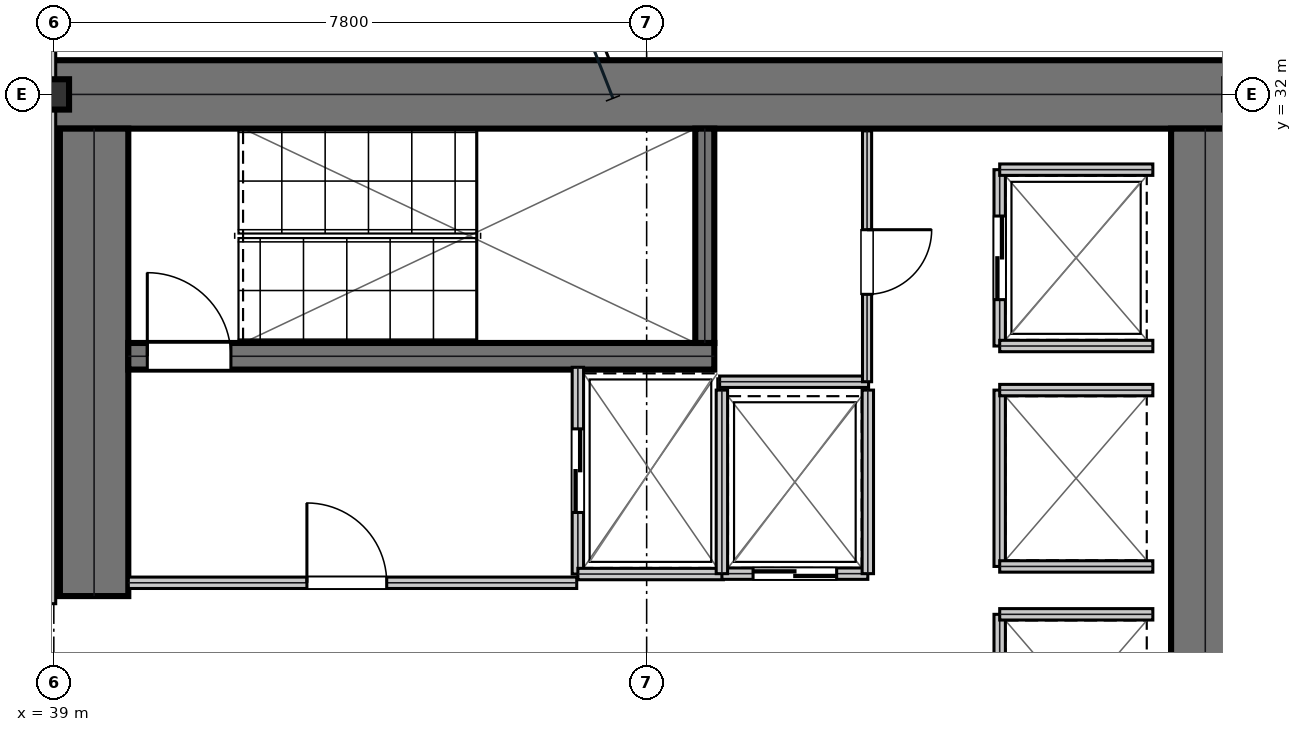
"""IFC4 building model, lengths in metres.
Left out: names, types, materials, properties, quantities, classifications, styles, units other than length and angle.
Written with IfcOpenShell. Run it as: python <this file> out.ifc"""

import sys

from ifc_helpers import new_model, si_unit, direction, frame, frame_2d, origin, origin_2d, place, context, subcontext, project, spatial, rectangle, i_section, extrude, element, fill, save


model = new_model("IFC4")
c1 = context("Model", 3, precision=1e-05, world=origin(), true_north=direction((0.0, 1.0)))
c2 = subcontext(c1, "Body", "Model", "MODEL_VIEW")
j1 = project(units=[si_unit("LENGTHUNIT", "METRE"), si_unit("PLANEANGLEUNIT", "RADIAN")], contexts=[c1])
p1 = place(None, origin())
s1 = spatial("IfcSite", under=j1, at=p1, CompositionType="ELEMENT")
p2 = place(p1, origin())
s2 = spatial("IfcBuilding", under=s1, at=p2, CompositionType="ELEMENT")
p3 = place(p2, frame((0.0, 0.0, 49.95)))
s3 = spatial("IfcBuildingStorey", under=s2, at=p3, CompositionType="ELEMENT", Elevation=49.95)
p4 = place(p3, frame((38.8, 32.0, 0.0), z_axis=(0.0, 0.0, 1.0), x_axis=(1.0, 0.0, 0.0)))
e1 = element("IfcWall", 1, at=p4, inside=s3, PredefinedType="SHEAR", context=c2, shape_type="SweptSolid", body=[
    extrude(rectangle(XDim=16.0, YDim=0.9, at=frame_2d((8.0, 0.0))), origin(), (0.0, 0.0, 1.0), 3.81),
])
p5 = place(p3, frame((39.53, 25.4, 0.0), z_axis=(0.0, 0.0, 1.0), x_axis=(0.0, 1.0, 0.0)))
e2 = element("IfcWall", 2, at=p5, inside=s3, PredefinedType="SHEAR", context=c2, shape_type="SweptSolid", body=[
    extrude(rectangle(XDim=6.15, YDim=0.9, at=frame_2d((3.075, 0.0))), origin(), (0.0, 0.0, 1.0), 3.81),
])
p6 = place(p3, frame((54.15, 16.45, 0.0), z_axis=(0.0, 0.0, 1.0), x_axis=(0.0, 1.0, 0.0)))
e3 = element("IfcWall", 3, at=p6, inside=s3, PredefinedType="SHEAR", context=c2, shape_type="SweptSolid", body=[
    extrude(rectangle(XDim=15.1, YDim=0.9, at=frame_2d((7.55, 0.0))), origin(), (0.0, 0.0, 1.0), 3.81),
])
p7 = place(p3, frame((39.98, 28.555, 0.0), z_axis=(0.0, 0.0, 1.0), x_axis=(1.0, 0.0, 0.0)))
e4 = element("IfcWall", 4, at=p7, inside=s3, PredefinedType="SHEAR", context=c2, shape_type="SweptSolid", body=[
    extrude(rectangle(XDim=7.71, YDim=0.35, at=frame_2d((3.855, 0.0))), origin(), (0.0, 0.0, 1.0), 3.81),
])
p8 = place(p7, frame((0.25, 0.0, 0.0)))
e5 = element("IfcOpeningElement", 5, at=p8, cuts=e4, PredefinedType="OPENING", context=c2, shape_type="SweptSolid", body=[
    extrude(rectangle(XDim=1.1, YDim=2.15, at=frame_2d((0.55, 1.075))), frame((0.0, 0.185, 0.0), z_axis=(0.0, -1.0, 0.0), x_axis=(1.0, 0.0, 0.0)), (0.0, 0.0, 1.0), 0.37),
])
p9 = place(p3, frame((47.565, 28.73, 0.0), z_axis=(0.0, 0.0, 1.0), x_axis=(0.0, 1.0, 0.0)))
e6 = element("IfcWall", 6, at=p9, inside=s3, PredefinedType="SHEAR", context=c2, shape_type="SweptSolid", body=[
    extrude(rectangle(XDim=2.82, YDim=0.25, at=frame_2d((1.41, 0.0))), origin(), (0.0, 0.0, 1.0), 3.81),
])
p10 = place(p3, frame((39.0, 32.0, 0.0), z_axis=(0.0, 0.0, 1.0), x_axis=(1.0, 0.0, 0.0)))
e7 = element("IfcColumn", 7, at=p10, inside=s3, PredefinedType="COLUMN", context=c2, shape_type="SweptSolid", body=[
    extrude(i_section(OverallWidth=0.401, OverallDepth=0.399, WebThickness=0.025, FlangeThickness=0.04, at=origin_2d()), origin(), (0.0, 0.0, 1.0), 4.044),
])
p11 = place(p3, frame((39.98, 25.575, 0.0), z_axis=(0.0, 0.0, 1.0), x_axis=(1.0, 0.0, 0.0)))
e8 = element("IfcWall", 8, at=p11, inside=s3, PredefinedType="PARTITIONING", context=c2, shape_type="SweptSolid", body=[
    extrude(rectangle(XDim=5.9, YDim=0.15, at=frame_2d((2.95, 0.0))), origin(), (0.0, 0.0, 1.0), 3.81),
])
p12 = place(p11, frame((2.35, 0.0, 0.0)))
e9 = element("IfcOpeningElement", 9, at=p12, cuts=e8, PredefinedType="OPENING", context=c2, shape_type="SweptSolid", body=[
    extrude(rectangle(XDim=1.05, YDim=2.15, at=frame_2d((0.525, 1.075))), frame((0.0, 0.085, 0.0), z_axis=(0.0, -1.0, 0.0), x_axis=(1.0, 0.0, 0.0)), (0.0, 0.0, 1.0), 0.17),
])
p13 = place(p3, frame((45.895, 25.69, 0.0), z_axis=(0.0, 0.0, 1.0), x_axis=(0.0, 1.0, 0.0)))
e10 = element("IfcWall", 10, at=p13, inside=s3, PredefinedType="PARTITIONING", context=c2, shape_type="SweptSolid", body=[
    extrude(rectangle(XDim=2.72, YDim=0.15, at=frame_2d((1.36, 0.0))), origin(), (0.0, 0.0, 1.0), 3.81),
])
p14 = place(p13, frame((0.81, 0.0, 0.0)))
e11 = element("IfcOpeningElement", 11, at=p14, cuts=e10, PredefinedType="OPENING", context=c2, shape_type="SweptSolid", body=[
    extrude(rectangle(XDim=1.1, YDim=2.15, at=frame_2d((0.55, 1.075))), frame((0.0, 0.085, 0.0), z_axis=(0.0, -1.0, 0.0), x_axis=(1.0, 0.0, 0.0)), (0.0, 0.0, 1.0), 0.17),
])
p15 = place(p3, frame((45.895, 25.69, 0.0), z_axis=(0.0, 0.0, 1.0), x_axis=(1.0, 0.0, 0.0)))
e12 = element("IfcWall", 12, at=p15, inside=s3, PredefinedType="PARTITIONING", context=c2, shape_type="SweptSolid", body=[
    extrude(rectangle(XDim=1.915, YDim=0.15, at=frame_2d((0.958, 0.0))), origin(), (0.0, 0.0, 1.0), 3.81),
])
p16 = place(p3, frame((47.79, 25.695, 0.0), z_axis=(0.0, 0.0, 1.0), x_axis=(1.0, 0.0, 0.0)))
e13 = element("IfcWall", 13, at=p16, inside=s3, PredefinedType="PARTITIONING", context=c2, shape_type="SweptSolid", body=[
    extrude(rectangle(XDim=1.92, YDim=0.15, at=frame_2d((0.96, 0.0))), origin(), (0.0, 0.0, 1.0), 3.81),
])
p17 = place(p16, frame((0.41, 0.0, 0.0)))
e14 = element("IfcOpeningElement", 14, at=p17, cuts=e13, PredefinedType="OPENING", context=c2, shape_type="SweptSolid", body=[
    extrude(rectangle(XDim=1.1, YDim=2.15, at=frame_2d((0.55, 1.075))), frame((0.0, 0.085, 0.0), z_axis=(0.0, -1.0, 0.0), x_axis=(1.0, 0.0, 0.0)), (0.0, 0.0, 1.0), 0.17),
])
for number, where, z_axis, x_axis in (
    (15, (47.79, 25.695, 0.0), (0.0, 0.0, 1.0), (0.0, 1.0, 0.0)),
    (16, (49.71, 25.695, 0.0), (0.0, 0.0, 1.0), (0.0, 1.0, 0.0)),
):
    element("IfcWall", number, at=place(p3, frame(where, z_axis=z_axis, x_axis=x_axis)), inside=s3, PredefinedType="PARTITIONING", context=c2, shape_type="SweptSolid", body=[
        extrude(rectangle(XDim=2.415, YDim=0.15, at=frame_2d((1.208, 0.0))), origin(), (0.0, 0.0, 1.0), 3.81),
    ])
p18 = place(p3, frame((51.445, 28.69, 0.0), z_axis=(0.0, 0.0, 1.0), x_axis=(0.0, 1.0, 0.0)))
e17 = element("IfcWall", 17, at=p18, inside=s3, PredefinedType="PARTITIONING", context=c2, shape_type="SweptSolid", body=[
    extrude(rectangle(XDim=2.32, YDim=0.15, at=frame_2d((1.16, 0.0))), origin(), (0.0, 0.0, 1.0), 3.81),
])
p19 = place(p18, frame((0.61, 0.0, 0.0)))
e18 = element("IfcOpeningElement", 18, at=p19, cuts=e17, PredefinedType="OPENING", context=c2, shape_type="SweptSolid", body=[
    extrude(rectangle(XDim=1.1, YDim=2.15, at=frame_2d((0.55, 1.075))), frame((0.0, 0.085, 0.0), z_axis=(0.0, -1.0, 0.0), x_axis=(1.0, 0.0, 0.0)), (0.0, 0.0, 1.0), 0.17),
])
for number, where, z_axis, x_axis in (
    (19, (51.445, 28.69, 0.0), (0.0, 0.0, 1.0), (1.0, 0.0, 0.0)),
    (20, (51.445, 31.01, 0.0), (0.0, 0.0, 1.0), (1.0, 0.0, 0.0)),
):
    element("IfcWall", number, at=place(p3, frame(where, z_axis=z_axis, x_axis=x_axis)), inside=s3, PredefinedType="PARTITIONING", context=c2, shape_type="SweptSolid", body=[
        extrude(rectangle(XDim=2.015, YDim=0.15, at=frame_2d((1.007, 0.0))), origin(), (0.0, 0.0, 1.0), 3.81),
    ])
p20 = place(p3, frame((51.445, 25.79, 0.0), z_axis=(0.0, 0.0, 1.0), x_axis=(0.0, 1.0, 0.0)))
e21 = element("IfcWall", 21, at=p20, inside=s3, PredefinedType="PARTITIONING", context=c2, shape_type="SweptSolid", body=[
    extrude(rectangle(XDim=2.32, YDim=0.15, at=frame_2d((1.16, 0.0))), origin(), (0.0, 0.0, 1.0), 3.81),
])
for number, where, z_axis, x_axis in (
    (22, (51.445, 25.79, 0.0), (0.0, 0.0, 1.0), (1.0, 0.0, 0.0)),
    (23, (51.445, 28.11, 0.0), (0.0, 0.0, 1.0), (1.0, 0.0, 0.0)),
):
    element("IfcWall", number, at=place(p3, frame(where, z_axis=z_axis, x_axis=x_axis)), inside=s3, PredefinedType="PARTITIONING", context=c2, shape_type="SweptSolid", body=[
        extrude(rectangle(XDim=2.015, YDim=0.15, at=frame_2d((1.007, 0.0))), origin(), (0.0, 0.0, 1.0), 3.81),
    ])
p21 = place(p3, frame((51.445, 22.84, 0.0), z_axis=(0.0, 0.0, 1.0), x_axis=(0.0, 1.0, 0.0)))
e24 = element("IfcWall", 24, at=p21, inside=s3, PredefinedType="PARTITIONING", context=c2, shape_type="SweptSolid", body=[
    extrude(rectangle(XDim=2.32, YDim=0.15, at=frame_2d((1.16, 0.0))), origin(), (0.0, 0.0, 1.0), 3.81),
])
p22 = place(p3, frame((51.445, 25.16, 0.0), z_axis=(0.0, 0.0, 1.0), x_axis=(1.0, 0.0, 0.0)))
e25 = element("IfcWall", 25, at=p22, inside=s3, PredefinedType="PARTITIONING", context=c2, shape_type="SweptSolid", body=[
    extrude(rectangle(XDim=2.015, YDim=0.15, at=frame_2d((1.007, 0.0))), origin(), (0.0, 0.0, 1.0), 3.81),
])
p23 = place(p3, frame((47.76, 28.22, 0.0), z_axis=(0.0, 0.0, 1.0), x_axis=(1.0, 0.0, 0.0)))
e26 = element("IfcWall", 26, at=p23, inside=s3, PredefinedType="PARTITIONING", context=c2, shape_type="SweptSolid", body=[
    extrude(rectangle(XDim=1.96, YDim=0.15, at=frame_2d((0.98, 0.0))), origin(), (0.0, 0.0, 1.0), 3.81),
])
p24 = place(p3, frame((49.7, 28.22, 0.0), z_axis=(0.0, 0.0, 1.0), x_axis=(0.0, 1.0, 0.0)))
e27 = element("IfcWall", 27, at=p24, inside=s3, PredefinedType="PARTITIONING", context=c2, shape_type="SweptSolid", body=[
    extrude(rectangle(XDim=3.3, YDim=0.12, at=frame_2d((1.65, 0.0))), origin(), (0.0, 0.0, 1.0), 3.81),
])
p25 = place(p24, frame((1.15, 0.0, 0.0)))
e28 = element("IfcOpeningElement", 28, at=p25, cuts=e27, PredefinedType="OPENING", context=c2, shape_type="SweptSolid", body=[
    extrude(rectangle(XDim=0.85, YDim=2.15, at=frame_2d((0.425, 1.075))), frame((0.0, 0.07, 0.0), z_axis=(0.0, -1.0, 0.0), x_axis=(1.0, 0.0, 0.0)), (0.0, 0.0, 1.0), 0.14),
])
p26 = place(p3, frame((38.95, 25.3, 0.0), z_axis=(0.0, 0.0, 1.0), x_axis=(0.0, 1.0, 0.0)))
e29 = element("IfcWall", 29, at=p26, inside=s3, PredefinedType="PARTITIONING", context=c2, shape_type="SweptSolid", body=[
    extrude(rectangle(XDim=8.2, YDim=0.15, at=frame_2d((4.1, 0.0))), origin(), (0.0, 0.0, 1.0), 3.181),
])
p27 = place(p12, origin())
e30 = element("IfcDoor", 30, at=p27, inside=s3, OperationType="SINGLE_SWING_LEFT", PredefinedType="DOOR", context=c2, shape_type="SweptSolid", body=[
    extrude(rectangle(XDim=1.05, YDim=2.15, at=frame_2d((0.525, 1.075))), frame((0.0, 0.025, 0.0), z_axis=(0.0, -1.0, 0.0), x_axis=(1.0, 0.0, 0.0)), (0.0, 0.0, 1.0), 0.05),
])
fill(e9, e30)
p28 = place(p14, frame((1.1, 0.0, 0.0), z_axis=(0.0, 0.0, 1.0), x_axis=(-1.0, 0.0, 0.0)))
e31 = element("IfcDoor", 31, at=p28, inside=s3, OperationType="DOUBLE_DOOR_SLIDING", PredefinedType="DOOR", context=c2, shape_type="SweptSolid", body=[
    extrude(rectangle(XDim=1.1, YDim=2.15, at=frame_2d((0.55, 1.075))), frame((0.0, 0.025, 0.0), z_axis=(0.0, -1.0, 0.0), x_axis=(1.0, 0.0, 0.0)), (0.0, 0.0, 1.0), 0.05),
])
fill(e11, e31)
p29 = place(p17, frame((1.1, 0.0, 0.0), z_axis=(0.0, 0.0, 1.0), x_axis=(-1.0, 0.0, 0.0)))
e32 = element("IfcDoor", 32, at=p29, inside=s3, OperationType="DOUBLE_DOOR_SLIDING", PredefinedType="DOOR", context=c2, shape_type="SweptSolid", body=[
    extrude(rectangle(XDim=1.1, YDim=2.15, at=frame_2d((0.55, 1.075))), frame((0.0, 0.025, 0.0), z_axis=(0.0, -1.0, 0.0), x_axis=(1.0, 0.0, 0.0)), (0.0, 0.0, 1.0), 0.05),
])
fill(e14, e32)
p30 = place(p19, frame((1.1, 0.0, 0.0), z_axis=(0.0, 0.0, 1.0), x_axis=(-1.0, 0.0, 0.0)))
e33 = element("IfcDoor", 33, at=p30, inside=s3, OperationType="DOUBLE_DOOR_SLIDING", PredefinedType="DOOR", context=c2, shape_type="SweptSolid", body=[
    extrude(rectangle(XDim=1.1, YDim=2.15, at=frame_2d((0.55, 1.075))), frame((0.0, 0.025, 0.0), z_axis=(0.0, -1.0, 0.0), x_axis=(1.0, 0.0, 0.0)), (0.0, 0.0, 1.0), 0.05),
])
fill(e18, e33)
p31 = place(p25, frame((0.85, 0.0, 0.0), z_axis=(0.0, 0.0, 1.0), x_axis=(-1.0, 0.0, 0.0)))
e34 = element("IfcDoor", 34, at=p31, inside=s3, OperationType="SINGLE_SWING_LEFT", PredefinedType="DOOR", context=c2, shape_type="SweptSolid", body=[
    extrude(rectangle(XDim=0.85, YDim=2.15, at=frame_2d((0.425, 1.075))), frame((0.0, 0.025, 0.0), z_axis=(0.0, -1.0, 0.0), x_axis=(1.0, 0.0, 0.0)), (0.0, 0.0, 1.0), 0.05),
])
fill(e28, e34)
p32 = place(p8, origin())
e35 = element("IfcDoor", 35, at=p32, inside=s3, OperationType="SINGLE_SWING_LEFT", PredefinedType="DOOR", context=c2, shape_type="SweptSolid", body=[
    extrude(rectangle(XDim=1.1, YDim=2.15, at=frame_2d((0.55, 1.075))), frame((0.0, 0.025, 0.0), z_axis=(0.0, -1.0, 0.0), x_axis=(1.0, 0.0, 0.0)), (0.0, 0.0, 1.0), 0.05),
])
fill(e5, e35)
save(model, sys.argv[1])
